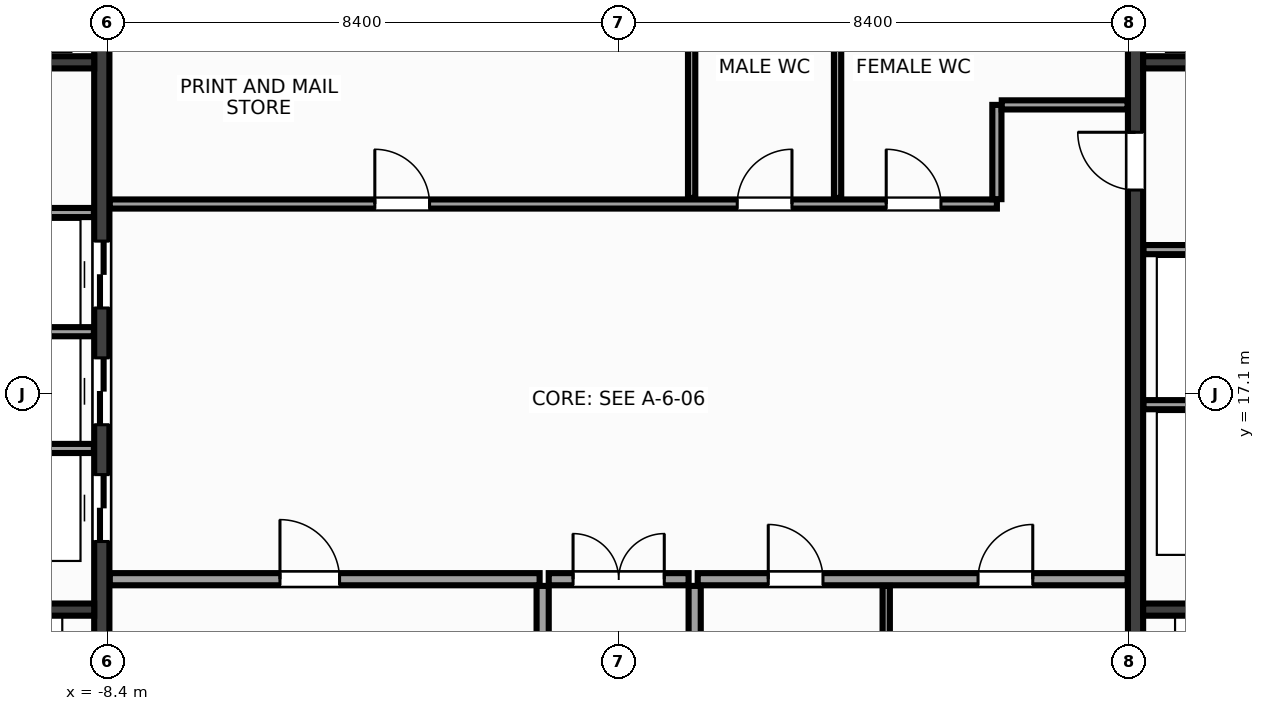
"""IFC4 building model, lengths in metres.
Left out: names, types, materials, properties, quantities, classifications, styles, units other than length and angle.
Written with IfcOpenShell. Run it as: python <this file> out.ifc"""

import sys

from ifc_helpers import new_model, si_unit, direction, frame, frame_2d, origin, place, context, subcontext, project, spatial, rectangle, extrude, source, transform, mapped, element, fill, save


model = new_model("IFC4")
c1 = context("Model", 3, precision=1e-05, world=origin(), true_north=direction((0.0, 1.0)))
c2 = subcontext(c1, "Body", "Model", "MODEL_VIEW")
j1 = project(units=[si_unit("LENGTHUNIT", "METRE"), si_unit("PLANEANGLEUNIT", "RADIAN")], contexts=[c1])
p1 = place(None, origin())
s1 = spatial("IfcSite", under=j1, at=p1, CompositionType="ELEMENT")
p2 = place(p1, origin())
s2 = spatial("IfcBuilding", under=s1, at=p2, CompositionType="ELEMENT")
p3 = place(p2, frame((0.0, 0.0, 246.8)))
s3 = spatial("IfcBuildingStorey", under=s2, at=p3, CompositionType="ELEMENT", Elevation=246.8)
m1 = source(origin(), c2, "Body", "SweptSolid", [
    extrude(rectangle(XDim=13.1, YDim=0.25, at=frame_2d((6.55, 0.0))), origin(), (0.0, 0.0, 1.0), 3.6),
])
p4 = place(p3, frame((-8.5, 10.45, 0.0), z_axis=(0.0, 0.0, 1.0), x_axis=(0.0, 1.0, 0.0)))
e1 = element("IfcWall", 1, at=p4, inside=s3, PredefinedType="SHEAR", context=c2, shape_type="MappedRepresentation", body=[
    mapped(m1, transform((0.0, 0.0, 0.0), x_axis=(1.0, 0.0, 0.0), y_axis=(0.0, 1.0, 0.0), z_axis=(0.0, 0.0, 1.0), scale=1.0)),
])
p5 = place(p4, frame((4.22, 0.0, 0.0)))
e2 = element("IfcOpeningElement", 2, at=p5, cuts=e1, PredefinedType="OPENING", context=c2, shape_type="SweptSolid", body=[
    extrude(rectangle(XDim=1.1, YDim=2.15, at=frame_2d((0.55, 1.075))), frame((0.0, 0.137, 0.0), z_axis=(0.0, -1.0, 0.0), x_axis=(1.0, 0.0, 0.0)), (0.0, 0.0, 1.0), 0.274),
])
p6 = place(p4, frame((6.14, 0.0, 0.0)))
e3 = element("IfcOpeningElement", 3, at=p6, cuts=e1, PredefinedType="OPENING", context=c2, shape_type="SweptSolid", body=[
    extrude(rectangle(XDim=1.1, YDim=2.15, at=frame_2d((0.55, 1.075))), frame((0.0, 0.137, 0.0), z_axis=(0.0, -1.0, 0.0), x_axis=(1.0, 0.0, 0.0)), (0.0, 0.0, 1.0), 0.274),
])
p7 = place(p4, frame((8.06, 0.0, 0.0)))
e4 = element("IfcOpeningElement", 4, at=p7, cuts=e1, PredefinedType="OPENING", context=c2, shape_type="SweptSolid", body=[
    extrude(rectangle(XDim=1.1, YDim=2.15, at=frame_2d((0.55, 1.075))), frame((0.0, 0.137, 0.0), z_axis=(0.0, -1.0, 0.0), x_axis=(1.0, 0.0, 0.0)), (0.0, 0.0, 1.0), 0.274),
])
p8 = place(p3, frame((8.5, 10.45, 0.0), z_axis=(0.0, 0.0, 1.0), x_axis=(0.0, 1.0, 0.0)))
e5 = element("IfcWall", 5, at=p8, inside=s3, PredefinedType="SHEAR", context=c2, shape_type="MappedRepresentation", body=[
    mapped(m1, transform((0.0, 0.0, 0.0), x_axis=(1.0, 0.0, 0.0), y_axis=(0.0, 1.0, 0.0), z_axis=(0.0, 0.0, 1.0), scale=1.0)),
])
p9 = place(p8, frame((10.0, 0.0, 0.0)))
e6 = element("IfcOpeningElement", 6, at=p9, cuts=e5, PredefinedType="OPENING", context=c2, shape_type="SweptSolid", body=[
    extrude(rectangle(XDim=0.95, YDim=2.15, at=frame_2d((0.475, 1.075))), frame((0.0, 0.137, 0.0), z_axis=(0.0, -1.0, 0.0), x_axis=(1.0, 0.0, 0.0)), (0.0, 0.0, 1.0), 0.274),
])
m2 = source(origin(), c2, "Body", "SweptSolid", [
    extrude(rectangle(XDim=2.825, YDim=0.2, at=frame_2d((1.413, 0.0))), origin(), (0.0, 0.0, 1.0), 3.6),
])
for number, where, z_axis, x_axis in (
    (7, (-11.45, 13.55, 0.0), (0.0, 0.0, 1.0), (1.0, 0.0, 0.0)),
    (8, (8.625, 13.55, 0.0), (0.0, 0.0, 1.0), (1.0, 0.0, 0.0)),
):
    element("IfcWall", number, at=place(p3, frame(where, z_axis=z_axis, x_axis=x_axis)), inside=s3, PredefinedType="SHEAR", context=c2, shape_type="MappedRepresentation", body=[
        mapped(m2, transform((0.0, 0.0, 0.0), x_axis=(1.0, 0.0, 0.0), y_axis=(0.0, 1.0, 0.0), z_axis=(0.0, 0.0, 1.0), scale=1.0)),
    ])
m3 = source(origin(), c2, "Body", "SweptSolid", [
    extrude(rectangle(XDim=3.02, YDim=0.2, at=frame_2d((1.51, 0.0))), origin(), (0.0, 0.0, 1.0), 3.6),
])
for number, where, z_axis, x_axis in (
    (9, (-11.645, 22.55, 0.0), (0.0, 0.0, 1.0), (1.0, 0.0, 0.0)),
    (10, (8.625, 22.55, 0.0), (0.0, 0.0, 1.0), (1.0, 0.0, 0.0)),
):
    element("IfcWall", number, at=place(p3, frame(where, z_axis=z_axis, x_axis=x_axis)), inside=s3, PredefinedType="SHEAR", context=c2, shape_type="MappedRepresentation", body=[
        mapped(m3, transform((0.0, 0.0, 0.0), x_axis=(1.0, 0.0, 0.0), y_axis=(0.0, 1.0, 0.0), z_axis=(0.0, 0.0, 1.0), scale=1.0)),
    ])
m4 = source(origin(), c2, "Body", "SweptSolid", [
    extrude(rectangle(XDim=3.01, YDim=0.15, at=frame_2d((1.505, 0.0))), origin(), (0.0, 0.0, 1.0), 3.37),
])
for number, where, z_axis, x_axis in (
    (11, (-11.64, 16.2, 0.0), (0.0, 0.0, 1.0), (1.0, 0.0, 0.0)),
    (12, (-11.64, 18.12, 0.0), (0.0, 0.0, 1.0), (1.0, 0.0, 0.0)),
    (13, (-11.64, 20.08, 0.0), (0.0, 0.0, 1.0), (1.0, 0.0, 0.0)),
    (14, (8.63, 16.92, 0.0), (0.0, 0.0, 1.0), (1.0, 0.0, 0.0)),
    (15, (8.63, 19.47, 0.0), (0.0, 0.0, 1.0), (1.0, 0.0, 0.0)),
):
    element("IfcWall", number, at=place(p3, frame(where, z_axis=z_axis, x_axis=x_axis)), inside=s3, PredefinedType="PARTITIONING", context=c2, shape_type="MappedRepresentation", body=[
        mapped(m4, transform((0.0, 0.0, 0.0), x_axis=(1.0, 0.0, 0.0), y_axis=(0.0, 1.0, 0.0), z_axis=(0.0, 0.0, 1.0), scale=1.0)),
    ])
m5 = source(origin(), c2, "Body", "SweptSolid", [
    extrude(rectangle(XDim=7.07, YDim=0.2, at=frame_2d((3.535, 0.0))), origin(), (0.0, 0.0, 1.0), 3.37),
])
p10 = place(p3, frame((-8.37, 14.05, 0.0), z_axis=(0.0, 0.0, 1.0), x_axis=(1.0, 0.0, 0.0)))
e16 = element("IfcWall", 16, at=p10, inside=s3, PredefinedType="PARTITIONING", context=c2, shape_type="MappedRepresentation", body=[
    mapped(m5, transform((0.0, 0.0, 0.0), x_axis=(1.0, 0.0, 0.0), y_axis=(0.0, 1.0, 0.0), z_axis=(0.0, 0.0, 1.0), scale=1.0)),
])
p11 = place(p10, frame((2.8, 0.0, 0.0)))
e17 = element("IfcOpeningElement", 17, at=p11, cuts=e16, PredefinedType="OPENING", context=c2, shape_type="SweptSolid", body=[
    extrude(rectangle(XDim=0.98, YDim=2.15, at=frame_2d((0.49, 1.075))), frame((0.0, 0.112, 0.0), z_axis=(0.0, -1.0, 0.0), x_axis=(1.0, 0.0, 0.0)), (0.0, 0.0, 1.0), 0.224),
])
p12 = place(p3, frame((1.3, 14.05, 0.0), z_axis=(0.0, 0.0, 1.0), x_axis=(1.0, 0.0, 0.0)))
e18 = element("IfcWall", 18, at=p12, inside=s3, PredefinedType="PARTITIONING", context=c2, shape_type="MappedRepresentation", body=[
    mapped(m5, transform((0.0, 0.0, 0.0), x_axis=(1.0, 0.0, 0.0), y_axis=(0.0, 1.0, 0.0), z_axis=(0.0, 0.0, 1.0), scale=1.0)),
])
p13 = place(p12, frame((1.16, 0.0, 0.0)))
e19 = element("IfcOpeningElement", 19, at=p13, cuts=e18, PredefinedType="OPENING", context=c2, shape_type="SweptSolid", body=[
    extrude(rectangle(XDim=0.9, YDim=2.15, at=frame_2d((0.45, 1.075))), frame((0.0, 0.112, 0.0), z_axis=(0.0, -1.0, 0.0), x_axis=(1.0, 0.0, 0.0)), (0.0, 0.0, 1.0), 0.224),
])
p14 = place(p12, frame((4.61, 0.0, 0.0)))
e20 = element("IfcOpeningElement", 20, at=p14, cuts=e18, PredefinedType="OPENING", context=c2, shape_type="SweptSolid", body=[
    extrude(rectangle(XDim=0.9, YDim=2.15, at=frame_2d((0.45, 1.075))), frame((0.0, 0.112, 0.0), z_axis=(0.0, -1.0, 0.0), x_axis=(1.0, 0.0, 0.0)), (0.0, 0.0, 1.0), 0.224),
])
m6 = source(origin(), c2, "Body", "SweptSolid", [
    extrude(rectangle(XDim=3.49, YDim=0.2, at=frame_2d((1.745, 0.0))), origin(), (0.0, 0.0, 1.0), 3.37),
])
for number, where, z_axis, x_axis in (
    (21, (-1.25, 10.45, 0.0), (0.0, 0.0, 1.0), (0.0, 1.0, 0.0)),
    (22, (1.25, 10.45, 0.0), (0.0, 0.0, 1.0), (0.0, 1.0, 0.0)),
):
    element("IfcWall", number, at=place(p3, frame(where, z_axis=z_axis, x_axis=x_axis)), inside=s3, PredefinedType="PARTITIONING", context=c2, shape_type="MappedRepresentation", body=[
        mapped(m6, transform((0.0, 0.0, 0.0), x_axis=(1.0, 0.0, 0.0), y_axis=(0.0, 1.0, 0.0), z_axis=(0.0, 0.0, 1.0), scale=1.0)),
    ])
m7 = source(origin(), c2, "Body", "SweptSolid", [
    extrude(rectangle(XDim=2.3, YDim=0.2, at=frame_2d((1.15, 0.0))), origin(), (0.0, 0.0, 1.0), 3.37),
])
p15 = place(p3, frame((-1.15, 14.05, 0.0), z_axis=(0.0, 0.0, 1.0), x_axis=(1.0, 0.0, 0.0)))
e23 = element("IfcWall", 23, at=p15, inside=s3, PredefinedType="PARTITIONING", context=c2, shape_type="MappedRepresentation", body=[
    mapped(m7, transform((0.0, 0.0, 0.0), x_axis=(1.0, 0.0, 0.0), y_axis=(0.0, 1.0, 0.0), z_axis=(0.0, 0.0, 1.0), scale=1.0)),
])
p16 = place(p15, frame((0.4, 0.0, 0.0)))
e24 = element("IfcOpeningElement", 24, at=p16, cuts=e23, PredefinedType="OPENING", context=c2, shape_type="SweptSolid", body=[
    extrude(rectangle(XDim=1.5, YDim=2.2, at=frame_2d((0.75, 1.1))), frame((0.0, 0.112, 0.0), z_axis=(0.0, -1.0, 0.0), x_axis=(1.0, 0.0, 0.0)), (0.0, 0.0, 1.0), 0.224),
])
m8 = source(origin(), c2, "Body", "SweptSolid", [
    extrude(rectangle(XDim=14.59, YDim=0.15, at=frame_2d((7.295, 0.0))), origin(), (0.0, 0.0, 1.0), 3.37),
])
p17 = place(p3, frame((-8.37, 20.22, 0.0), z_axis=(0.0, 0.0, 1.0), x_axis=(1.0, 0.0, 0.0)))
e25 = element("IfcWall", 25, at=p17, inside=s3, PredefinedType="PARTITIONING", context=c2, shape_type="MappedRepresentation", body=[
    mapped(m8, transform((0.0, 0.0, 0.0), x_axis=(1.0, 0.0, 0.0), y_axis=(0.0, 1.0, 0.0), z_axis=(0.0, 0.0, 1.0), scale=1.0)),
])
p18 = place(p17, frame((4.36, 0.0, 0.0)))
e26 = element("IfcOpeningElement", 26, at=p18, cuts=e25, PredefinedType="OPENING", context=c2, shape_type="SweptSolid", body=[
    extrude(rectangle(XDim=0.9, YDim=2.15, at=frame_2d((0.45, 1.075))), frame((0.0, 0.087, 0.0), z_axis=(0.0, -1.0, 0.0), x_axis=(1.0, 0.0, 0.0)), (0.0, 0.0, 1.0), 0.174),
])
p19 = place(p17, frame((10.32, 0.0, 0.0)))
e27 = element("IfcOpeningElement", 27, at=p19, cuts=e25, PredefinedType="OPENING", context=c2, shape_type="SweptSolid", body=[
    extrude(rectangle(XDim=0.9, YDim=2.15, at=frame_2d((0.45, 1.075))), frame((0.0, 0.087, 0.0), z_axis=(0.0, -1.0, 0.0), x_axis=(1.0, 0.0, 0.0)), (0.0, 0.0, 1.0), 0.174),
])
p20 = place(p17, frame((12.77, 0.0, 0.0)))
e28 = element("IfcOpeningElement", 28, at=p20, cuts=e25, PredefinedType="OPENING", context=c2, shape_type="SweptSolid", body=[
    extrude(rectangle(XDim=0.9, YDim=2.15, at=frame_2d((0.45, 1.075))), frame((0.0, 0.087, 0.0), z_axis=(0.0, -1.0, 0.0), x_axis=(1.0, 0.0, 0.0)), (0.0, 0.0, 1.0), 0.174),
])
m9 = source(origin(), c2, "Body", "SweptSolid", [
    extrude(rectangle(XDim=1.55, YDim=0.15, at=frame_2d((0.775, 0.0))), origin(), (0.0, 0.0, 1.0), 3.37),
])
p21 = place(p3, frame((6.22, 20.3, 0.0), z_axis=(0.0, 0.0, 1.0), x_axis=(0.0, 1.0, 0.0)))
e29 = element("IfcWall", 29, at=p21, inside=s3, PredefinedType="PARTITIONING", context=c2, shape_type="MappedRepresentation", body=[
    mapped(m9, transform((0.0, 0.0, 0.0), x_axis=(1.0, 0.0, 0.0), y_axis=(0.0, 1.0, 0.0), z_axis=(0.0, 0.0, 1.0), scale=1.0)),
])
m10 = source(origin(), c2, "Body", "SweptSolid", [
    extrude(rectangle(XDim=2.07, YDim=0.15, at=frame_2d((1.035, 0.0))), origin(), (0.0, 0.0, 1.0), 3.37),
])
p22 = place(p3, frame((6.3, 21.85, 0.0), z_axis=(0.0, 0.0, 1.0), x_axis=(1.0, 0.0, 0.0)))
e30 = element("IfcWall", 30, at=p22, inside=s3, PredefinedType="PARTITIONING", context=c2, shape_type="MappedRepresentation", body=[
    mapped(m10, transform((0.0, 0.0, 0.0), x_axis=(1.0, 0.0, 0.0), y_axis=(0.0, 1.0, 0.0), z_axis=(0.0, 0.0, 1.0), scale=1.0)),
])
m11 = source(origin(), c2, "Body", "SweptSolid", [
    extrude(rectangle(XDim=3.49, YDim=0.12, at=frame_2d((1.745, 0.0))), origin(), (0.0, 0.0, 1.0), 3.37),
])
p23 = place(p3, frame((4.4, 10.45, 0.0), z_axis=(0.0, 0.0, 1.0), x_axis=(0.0, 1.0, 0.0)))
e31 = element("IfcWall", 31, at=p23, inside=s3, PredefinedType="PARTITIONING", context=c2, shape_type="MappedRepresentation", body=[
    mapped(m11, transform((0.0, 0.0, 0.0), x_axis=(1.0, 0.0, 0.0), y_axis=(0.0, 1.0, 0.0), z_axis=(0.0, 0.0, 1.0), scale=1.0)),
])
m12 = source(origin(), c2, "Body", "SweptSolid", [
    extrude(rectangle(XDim=3.19, YDim=0.12, at=frame_2d((1.595, 0.0))), origin(), (0.0, 0.0, 1.0), 3.37),
])
for number, where, z_axis, x_axis in (
    (32, (1.2, 20.32, 0.0), (0.0, 0.0, 1.0), (0.0, 1.0, 0.0)),
    (33, (3.6, 20.32, 0.0), (0.0, 0.0, 1.0), (0.0, 1.0, 0.0)),
):
    element("IfcWall", number, at=place(p3, frame(where, z_axis=z_axis, x_axis=x_axis)), inside=s3, PredefinedType="PARTITIONING", context=c2, shape_type="MappedRepresentation", body=[
        mapped(m12, transform((0.0, 0.0, 0.0), x_axis=(1.0, 0.0, 0.0), y_axis=(0.0, 1.0, 0.0), z_axis=(0.0, 0.0, 1.0), scale=1.0)),
    ])
m13 = source(origin(), c2, "Body", "SweptSolid", [
    extrude(rectangle(XDim=1.1, YDim=2.15, at=frame_2d((0.55, 1.075))), frame((0.0, 0.025, 0.0), z_axis=(0.0, -1.0, 0.0), x_axis=(1.0, 0.0, 0.0)), (0.0, 0.0, 1.0), 0.05),
])
p24 = place(p5, origin())
e34 = element("IfcDoor", 34, at=p24, inside=s3, OperationType="DOUBLE_DOOR_SLIDING", PredefinedType="DOOR", context=c2, shape_type="MappedRepresentation", body=[
    mapped(m13, transform((0.0, 0.0, 0.0), x_axis=(1.0, 0.0, 0.0), y_axis=(0.0, 1.0, 0.0), z_axis=(0.0, 0.0, 1.0), scale=1.0)),
])
fill(e2, e34)
p25 = place(p6, origin())
e35 = element("IfcDoor", 35, at=p25, inside=s3, OperationType="DOUBLE_DOOR_SLIDING", PredefinedType="DOOR", context=c2, shape_type="MappedRepresentation", body=[
    mapped(m13, transform((0.0, 0.0, 0.0), x_axis=(1.0, 0.0, 0.0), y_axis=(0.0, 1.0, 0.0), z_axis=(0.0, 0.0, 1.0), scale=1.0)),
])
fill(e3, e35)
p26 = place(p7, origin())
e36 = element("IfcDoor", 36, at=p26, inside=s3, OperationType="DOUBLE_DOOR_SLIDING", PredefinedType="DOOR", context=c2, shape_type="MappedRepresentation", body=[
    mapped(m13, transform((0.0, 0.0, 0.0), x_axis=(1.0, 0.0, 0.0), y_axis=(0.0, 1.0, 0.0), z_axis=(0.0, 0.0, 1.0), scale=1.0)),
])
fill(e4, e36)
m14 = source(origin(), c2, "Body", "SweptSolid", [
    extrude(rectangle(XDim=0.95, YDim=2.15, at=frame_2d((0.475, 1.075))), frame((0.0, 0.025, 0.0), z_axis=(0.0, -1.0, 0.0), x_axis=(1.0, 0.0, 0.0)), (0.0, 0.0, 1.0), 0.05),
])
p27 = place(p9, origin())
e37 = element("IfcDoor", 37, at=p27, inside=s3, OperationType="SINGLE_SWING_RIGHT", PredefinedType="DOOR", context=c2, shape_type="MappedRepresentation", body=[
    mapped(m14, transform((0.0, 0.0, 0.0), x_axis=(1.0, 0.0, 0.0), y_axis=(0.0, 1.0, 0.0), z_axis=(0.0, 0.0, 1.0), scale=1.0)),
])
fill(e6, e37)
m15 = source(origin(), c2, "Body", "SweptSolid", [
    extrude(rectangle(XDim=0.98, YDim=2.15, at=frame_2d((0.49, 1.075))), frame((0.0, 0.025, 0.0), z_axis=(0.0, -1.0, 0.0), x_axis=(1.0, 0.0, 0.0)), (0.0, 0.0, 1.0), 0.05),
])
p28 = place(p11, origin())
e38 = element("IfcDoor", 38, at=p28, inside=s3, OperationType="SINGLE_SWING_LEFT", PredefinedType="DOOR", context=c2, shape_type="MappedRepresentation", body=[
    mapped(m15, transform((0.0, 0.0, 0.0), x_axis=(1.0, 0.0, 0.0), y_axis=(0.0, 1.0, 0.0), z_axis=(0.0, 0.0, 1.0), scale=1.0)),
])
fill(e17, e38)
m16 = source(origin(), c2, "Body", "SweptSolid", [
    extrude(rectangle(XDim=0.9, YDim=2.15, at=frame_2d((0.45, 1.075))), frame((0.0, 0.025, 0.0), z_axis=(0.0, -1.0, 0.0), x_axis=(1.0, 0.0, 0.0)), (0.0, 0.0, 1.0), 0.05),
])
p29 = place(p13, origin())
e39 = element("IfcDoor", 39, at=p29, inside=s3, OperationType="SINGLE_SWING_LEFT", PredefinedType="DOOR", context=c2, shape_type="MappedRepresentation", body=[
    mapped(m16, transform((0.0, 0.0, 0.0), x_axis=(1.0, 0.0, 0.0), y_axis=(0.0, 1.0, 0.0), z_axis=(0.0, 0.0, 1.0), scale=1.0)),
])
fill(e19, e39)
p30 = place(p14, origin())
e40 = element("IfcDoor", 40, at=p30, inside=s3, OperationType="SINGLE_SWING_RIGHT", PredefinedType="DOOR", context=c2, shape_type="MappedRepresentation", body=[
    mapped(m16, transform((0.0, 0.0, 0.0), x_axis=(1.0, 0.0, 0.0), y_axis=(0.0, 1.0, 0.0), z_axis=(0.0, 0.0, 1.0), scale=1.0)),
])
fill(e20, e40)
m17 = source(origin(), c2, "Body", "SweptSolid", [
    extrude(rectangle(XDim=1.5, YDim=2.2, at=frame_2d((0.75, 1.1))), frame((0.0, 0.025, 0.0), z_axis=(0.0, -1.0, 0.0), x_axis=(1.0, 0.0, 0.0)), (0.0, 0.0, 1.0), 0.05),
])
p31 = place(p16, origin())
e41 = element("IfcDoor", 41, at=p31, inside=s3, OperationType="DOUBLE_DOOR_SINGLE_SWING", PredefinedType="DOOR", context=c2, shape_type="MappedRepresentation", body=[
    mapped(m17, transform((0.0, 0.0, 0.0), x_axis=(1.0, 0.0, 0.0), y_axis=(0.0, 1.0, 0.0), z_axis=(0.0, 0.0, 1.0), scale=1.0)),
])
fill(e24, e41)
p32 = place(p18, origin())
e42 = element("IfcDoor", 42, at=p32, inside=s3, OperationType="SINGLE_SWING_LEFT", PredefinedType="DOOR", context=c2, shape_type="MappedRepresentation", body=[
    mapped(m16, transform((0.0, 0.0, 0.0), x_axis=(1.0, 0.0, 0.0), y_axis=(0.0, 1.0, 0.0), z_axis=(0.0, 0.0, 1.0), scale=1.0)),
])
fill(e26, e42)
p33 = place(p19, origin())
e43 = element("IfcDoor", 43, at=p33, inside=s3, OperationType="SINGLE_SWING_RIGHT", PredefinedType="DOOR", context=c2, shape_type="MappedRepresentation", body=[
    mapped(m16, transform((0.0, 0.0, 0.0), x_axis=(1.0, 0.0, 0.0), y_axis=(0.0, 1.0, 0.0), z_axis=(0.0, 0.0, 1.0), scale=1.0)),
])
fill(e27, e43)
p34 = place(p20, origin())
e44 = element("IfcDoor", 44, at=p34, inside=s3, OperationType="SINGLE_SWING_LEFT", PredefinedType="DOOR", context=c2, shape_type="MappedRepresentation", body=[
    mapped(m16, transform((0.0, 0.0, 0.0), x_axis=(1.0, 0.0, 0.0), y_axis=(0.0, 1.0, 0.0), z_axis=(0.0, 0.0, 1.0), scale=1.0)),
])
fill(e28, e44)
save(model, sys.argv[1])
